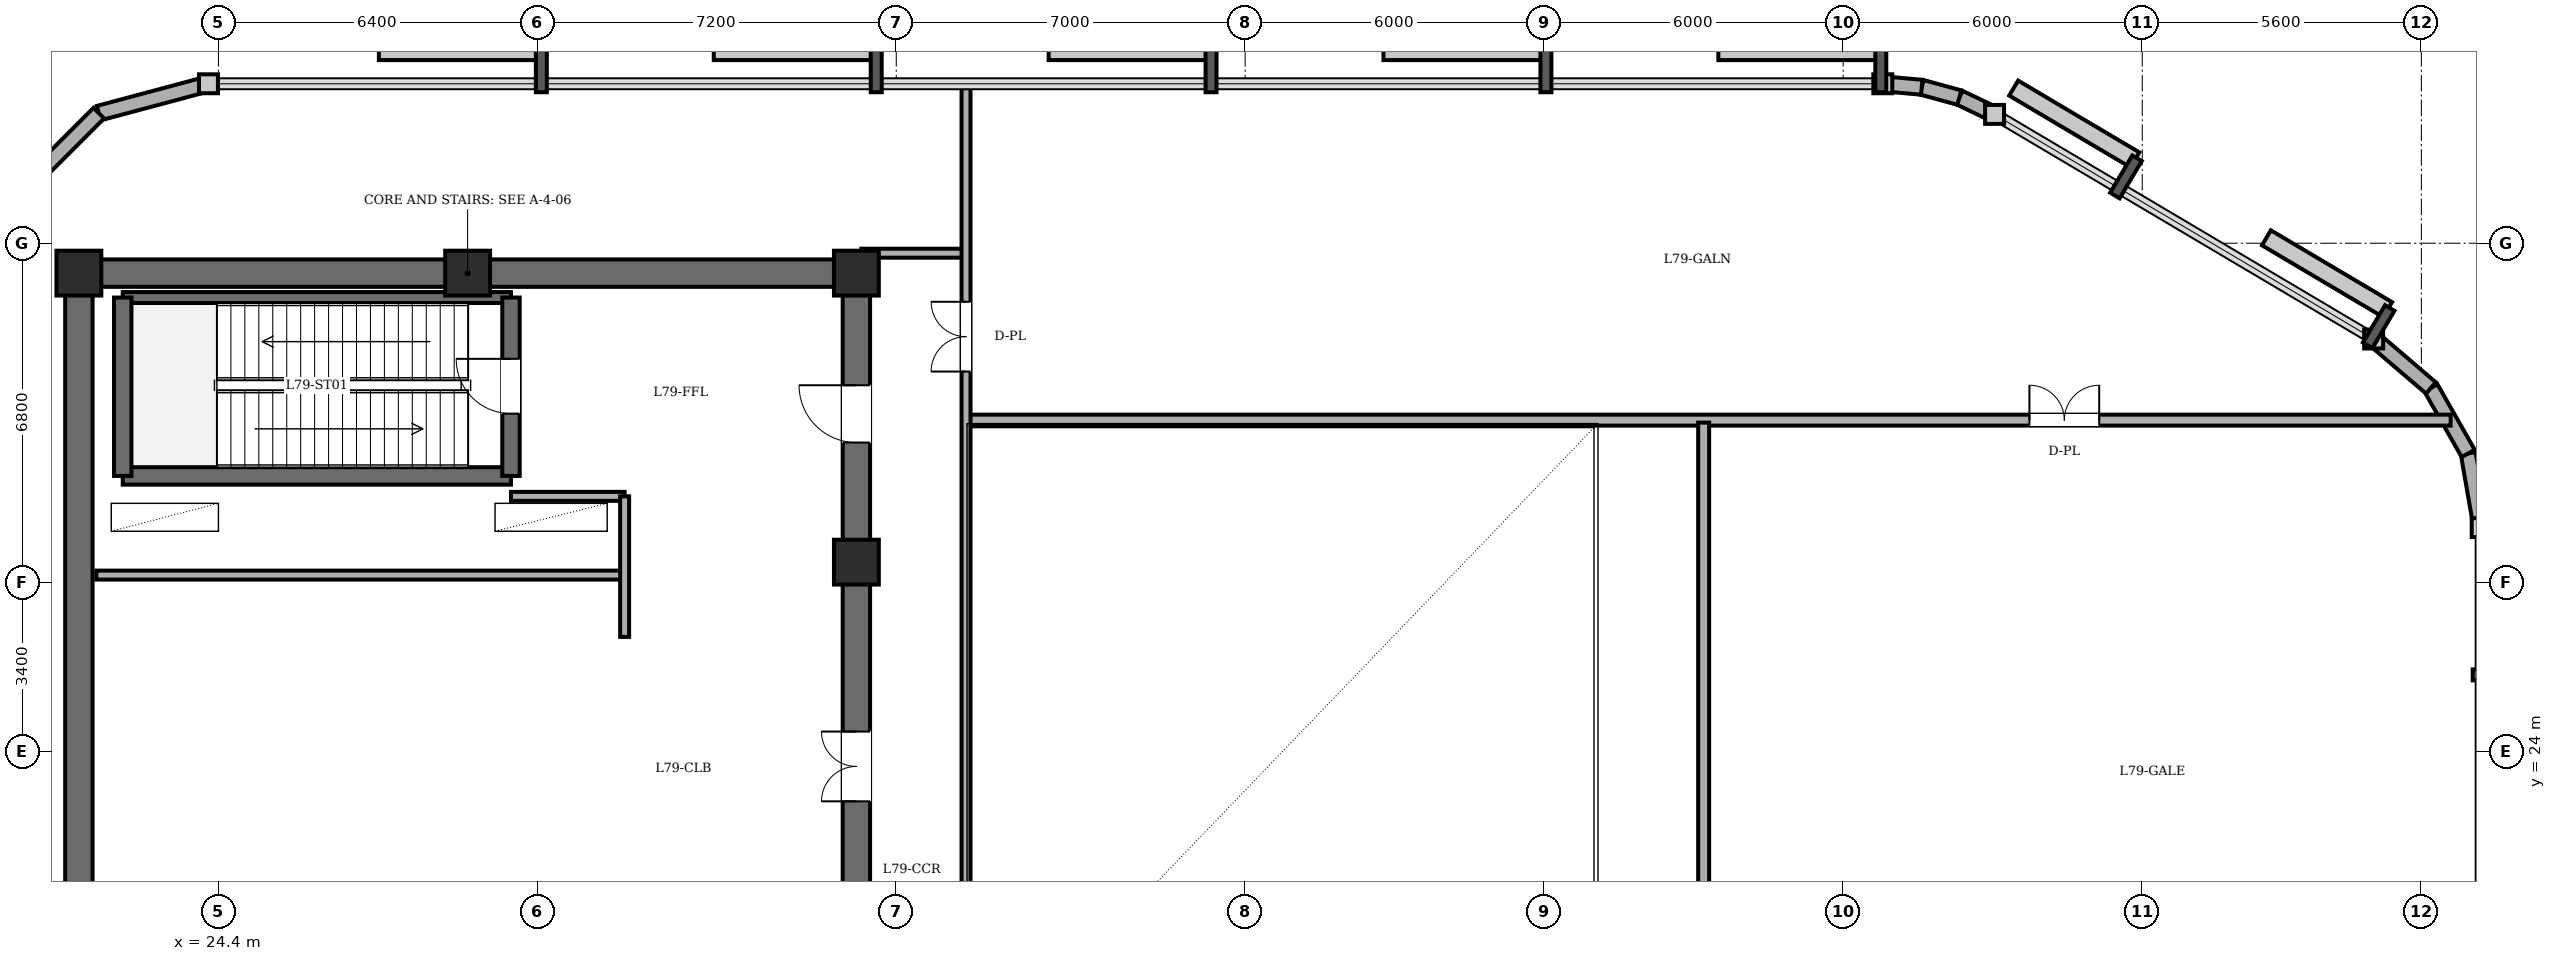
"""IFC4 building model, lengths in metres.
Left out: names, types, materials, properties, quantities, classifications, styles, units other than length and angle.
Written with IfcOpenShell. Run it as: python <this file> out.ifc"""

import sys

from ifc_helpers import new_model, si_unit, direction, frame, frame_2d, origin, origin_2d, place, context, subcontext, project, spatial, rectangle, extrude, element, fill, save


model = new_model("IFC4")
c1 = context("Model", 3, precision=1e-05, world=origin(), true_north=direction((0.0, 1.0)))
c2 = subcontext(c1, "Body", "Model", "MODEL_VIEW")
j1 = project(units=[si_unit("LENGTHUNIT", "METRE"), si_unit("PLANEANGLEUNIT", "RADIAN")], contexts=[c1])
p1 = place(None, origin())
s1 = spatial("IfcSite", under=j1, at=p1, CompositionType="ELEMENT")
p2 = place(p1, origin())
s2 = spatial("IfcBuilding", under=s1, at=p2, CompositionType="ELEMENT")
p3 = place(p2, frame((0.0, 0.0, 308.0)))
s3 = spatial("IfcBuildingStorey", under=s2, at=p3, CompositionType="ELEMENT", Elevation=308.0)
for number, where, z_axis, x_axis in (
    (1, (37.2, 27.8, 0.0), (0.0, 0.0, 1.0), (1.0, 0.0, 0.0)),
    (2, (37.2, 33.6, 0.0), (0.0, 0.0, 1.0), (1.0, 0.0, 0.0)),
    (3, (29.4, 33.6, 0.0), (0.0, 0.0, 1.0), (1.0, 0.0, 0.0)),
    (4, (21.6, 33.6, 0.0), (0.0, 0.0, 1.0), (1.0, 0.0, 0.0)),
):
    element("IfcColumn", number, at=place(p3, frame(where, z_axis=z_axis, x_axis=x_axis)), inside=s3, PredefinedType="COLUMN", context=c2, shape_type="SweptSolid", body=[
        extrude(rectangle(XDim=0.9, YDim=0.9, at=origin_2d()), origin(), (0.0, 0.0, 1.0), 7.2),
    ])
p4 = place(p3, frame((69.8, 28.493, 0.0), z_axis=(0.0, 0.0, 1.0), x_axis=(-0.172015950979, 0.985094164336, 0.0)))
e5 = element("IfcWall", 5, at=p4, inside=s3, PredefinedType="SOLIDWALL", context=c2, shape_type="SweptSolid", body=[
    extrude(rectangle(XDim=1.511, YDim=0.3, at=frame_2d((0.756, 0.0))), origin(), (0.0, 0.0, 1.0), 7.2),
])
p5 = place(p3, frame((69.54, 29.982, 0.0), z_axis=(0.0, 0.0, 1.0), x_axis=(-0.494747166685, 0.869036961847, 0.0)))
e6 = element("IfcWall", 6, at=p5, inside=s3, PredefinedType="SOLIDWALL", context=c2, shape_type="SweptSolid", body=[
    extrude(rectangle(XDim=1.512, YDim=0.3, at=frame_2d((0.756, 0.0))), origin(), (0.0, 0.0, 1.0), 7.2),
])
p6 = place(p3, frame((68.792, 31.296, 0.0), z_axis=(0.0, 0.0, 1.0), x_axis=(-0.76011105051, 0.649793190863, 0.0)))
e7 = element("IfcWall", 7, at=p6, inside=s3, PredefinedType="SOLIDWALL", context=c2, shape_type="SweptSolid", body=[
    extrude(rectangle(XDim=1.511, YDim=0.3, at=frame_2d((0.756, 0.0))), origin(), (0.0, 0.0, 1.0), 7.2),
])
p7 = place(p3, frame((60.037, 36.785, 0.0), z_axis=(0.0, 0.0, 1.0), x_axis=(-0.902139493314, 0.43144447453, 0.0)))
e8 = element("IfcWall", 8, at=p7, inside=s3, PredefinedType="SOLIDWALL", context=c2, shape_type="SweptSolid", body=[
    extrude(rectangle(XDim=0.784, YDim=0.3, at=frame_2d((0.392, 0.0))), origin(), (0.0, 0.0, 1.0), 7.2),
])
p8 = place(p3, frame((59.33, 37.123, 0.0), z_axis=(0.0, 0.0, 1.0), x_axis=(-0.964410376476, 0.264409957728, 0.0)))
e9 = element("IfcWall", 9, at=p8, inside=s3, PredefinedType="SOLIDWALL", context=c2, shape_type="SweptSolid", body=[
    extrude(rectangle(XDim=0.783, YDim=0.3, at=frame_2d((0.392, 0.0))), origin(), (0.0, 0.0, 1.0), 7.2),
])
p9 = place(p3, frame((58.575, 37.33, 0.0), z_axis=(0.0, 0.0, 1.0), x_axis=(-0.996027356167, 0.089047772386, 0.0)))
e10 = element("IfcWall", 10, at=p9, inside=s3, PredefinedType="SOLIDWALL", context=c2, shape_type="SweptSolid", body=[
    extrude(rectangle(XDim=0.784, YDim=0.3, at=frame_2d((0.392, 0.0))), origin(), (0.0, 0.0, 1.0), 7.2),
])
p10 = place(p3, frame((24.2, 37.4, 0.0), z_axis=(0.0, 0.0, 1.0), x_axis=(-0.965992531735, -0.258569968543, 0.0)))
e11 = element("IfcWall", 11, at=p10, inside=s3, PredefinedType="SOLIDWALL", context=c2, shape_type="SweptSolid", body=[
    extrude(rectangle(XDim=2.277, YDim=0.3, at=frame_2d((1.139, 0.0))), origin(), (0.0, 0.0, 1.0), 7.2),
])
p11 = place(p3, frame((22.0, 36.811, 0.0), z_axis=(0.0, 0.0, 1.0), x_axis=(-0.707106781187, -0.707106781187, 0.0)))
e12 = element("IfcWall", 12, at=p11, inside=s3, PredefinedType="SOLIDWALL", context=c2, shape_type="SweptSolid", body=[
    extrude(rectangle(XDim=2.278, YDim=0.3, at=frame_2d((1.139, 0.0))), origin(), (0.0, 0.0, 1.0), 7.2),
])
p12 = place(p3, frame((21.6, 14.4, 0.0), z_axis=(0.0, 0.0, 1.0), x_axis=(0.0, 1.0, 0.0)))
e13 = element("IfcWall", 13, at=p12, inside=s3, PredefinedType="SHEAR", context=c2, shape_type="SweptSolid", body=[
    extrude(rectangle(XDim=19.2, YDim=0.55, at=frame_2d((9.6, 0.0))), origin(), (0.0, 0.0, 1.0), 6.95),
])
p13 = place(p3, frame((21.6, 33.6, 0.0), z_axis=(0.0, 0.0, 1.0), x_axis=(1.0, 0.0, 0.0)))
e14 = element("IfcWall", 14, at=p13, inside=s3, PredefinedType="SHEAR", context=c2, shape_type="SweptSolid", body=[
    extrude(rectangle(XDim=15.6, YDim=0.55, at=frame_2d((7.8, 0.0))), origin(), (0.0, 0.0, 1.0), 6.95),
])
p14 = place(p3, frame((37.2, 14.4, 0.0), z_axis=(0.0, 0.0, 1.0), x_axis=(0.0, 1.0, 0.0)))
e15 = element("IfcWall", 15, at=p14, inside=s3, PredefinedType="SHEAR", context=c2, shape_type="SweptSolid", body=[
    extrude(rectangle(XDim=19.2, YDim=0.55, at=frame_2d((9.6, 0.0))), origin(), (0.0, 0.0, 1.0), 6.95),
])
p15 = place(p14, frame((15.8, 0.0, 0.0)))
e16 = element("IfcOpeningElement", 16, at=p15, cuts=e15, PredefinedType="OPENING", context=c2, shape_type="SweptSolid", body=[
    extrude(rectangle(XDim=1.15, YDim=2.15, at=frame_2d((0.575, 1.075))), frame((0.0, 0.285, 0.0), z_axis=(0.0, -1.0, 0.0), x_axis=(1.0, 0.0, 0.0)), (0.0, 0.0, 1.0), 0.57),
])
p16 = place(p14, frame((3.6, 0.0, 0.0)))
e17 = element("IfcOpeningElement", 17, at=p16, cuts=e15, PredefinedType="OPENING", context=c2, shape_type="SweptSolid", body=[
    extrude(rectangle(XDim=1.1, YDim=2.15, at=frame_2d((0.55, 1.075))), frame((0.0, 0.285, 0.0), z_axis=(0.0, -1.0, 0.0), x_axis=(1.0, 0.0, 0.0)), (0.0, 0.0, 1.0), 0.57),
])
p17 = place(p14, frame((8.6, 0.0, 0.0)))
e18 = element("IfcOpeningElement", 18, at=p17, cuts=e15, PredefinedType="OPENING", context=c2, shape_type="SweptSolid", body=[
    extrude(rectangle(XDim=1.4, YDim=2.25, at=frame_2d((0.7, 1.125))), frame((0.0, 0.285, 0.0), z_axis=(0.0, -1.0, 0.0), x_axis=(1.0, 0.0, 0.0)), (0.0, 0.0, 1.0), 0.57),
])
p18 = place(p3, frame((22.48, 29.53, 0.0), z_axis=(0.0, 0.0, 1.0), x_axis=(1.0, 0.0, 0.0)))
e19 = element("IfcWall", 19, at=p18, inside=s3, PredefinedType="SOLIDWALL", context=c2, shape_type="SweptSolid", body=[
    extrude(rectangle(XDim=7.79, YDim=0.35, at=frame_2d((3.895, 0.0))), origin(), (0.0, 0.0, 1.0), 6.95),
])
p19 = place(p3, frame((22.48, 33.11, 0.0), z_axis=(0.0, 0.0, 1.0), x_axis=(1.0, 0.0, 0.0)))
e20 = element("IfcWall", 20, at=p19, inside=s3, PredefinedType="PARTITIONING", context=c2, shape_type="SweptSolid", body=[
    extrude(rectangle(XDim=7.79, YDim=0.22, at=frame_2d((3.895, 0.0))), origin(), (0.0, 0.0, 1.0), 6.95),
])
p20 = place(p3, frame((22.48, 29.53, 0.0), z_axis=(0.0, 0.0, 1.0), x_axis=(0.0, 1.0, 0.0)))
e21 = element("IfcWall", 21, at=p20, inside=s3, PredefinedType="SOLIDWALL", context=c2, shape_type="SweptSolid", body=[
    extrude(rectangle(XDim=3.58, YDim=0.35, at=frame_2d((1.79, 0.0))), origin(), (0.0, 0.0, 1.0), 6.95),
])
p21 = place(p3, frame((30.27, 29.53, 0.0), z_axis=(0.0, 0.0, 1.0), x_axis=(0.0, 1.0, 0.0)))
e22 = element("IfcWall", 22, at=p21, inside=s3, PredefinedType="SOLIDWALL", context=c2, shape_type="SweptSolid", body=[
    extrude(rectangle(XDim=3.58, YDim=0.35, at=frame_2d((1.79, 0.0))), origin(), (0.0, 0.0, 1.0), 6.95),
])
p22 = place(p21, frame((1.25, 0.0, 0.0)))
e23 = element("IfcOpeningElement", 23, at=p22, cuts=e22, PredefinedType="OPENING", context=c2, shape_type="SweptSolid", body=[
    extrude(rectangle(XDim=1.1, YDim=2.15, at=frame_2d((0.55, 1.075))), frame((0.0, 0.185, 0.0), z_axis=(0.0, -1.0, 0.0), x_axis=(1.0, 0.0, 0.0)), (0.0, 0.0, 1.0), 0.37),
])
p23 = place(p3, frame((30.27, 29.12, 0.0), z_axis=(0.0, 0.0, 1.0), x_axis=(1.0, 0.0, 0.0)))
e24 = element("IfcWall", 24, at=p23, inside=s3, PredefinedType="PARTITIONING", context=c2, shape_type="SweptSolid", body=[
    extrude(rectangle(XDim=2.28, YDim=0.18, at=frame_2d((1.14, 0.0))), origin(), (0.0, 0.0, 1.0), 6.95),
])
p24 = place(p3, frame((21.95, 27.54, 0.0), z_axis=(0.0, 0.0, 1.0), x_axis=(1.0, 0.0, 0.0)))
e25 = element("IfcWall", 25, at=p24, inside=s3, PredefinedType="PARTITIONING", context=c2, shape_type="SweptSolid", body=[
    extrude(rectangle(XDim=10.6, YDim=0.18, at=frame_2d((5.3, 0.0))), origin(), (0.0, 0.0, 1.0), 6.95),
])
p25 = place(p3, frame((32.55, 26.3, 0.0), z_axis=(0.0, 0.0, 1.0), x_axis=(0.0, 1.0, 0.0)))
e26 = element("IfcWall", 26, at=p25, inside=s3, PredefinedType="PARTITIONING", context=c2, shape_type="SweptSolid", body=[
    extrude(rectangle(XDim=2.82, YDim=0.18, at=frame_2d((1.41, 0.0))), origin(), (0.0, 0.0, 1.0), 6.95),
])
p26 = place(p3, frame((39.4, 30.65, 0.0), z_axis=(0.0, 0.0, 1.0), x_axis=(1.0, 0.0, 0.0)))
e27 = element("IfcWall", 27, at=p26, inside=s3, PredefinedType="PARTITIONING", context=c2, shape_type="SweptSolid", body=[
    extrude(rectangle(XDim=29.788, YDim=0.22, at=frame_2d((14.894, 0.0))), origin(), (0.0, 0.0, 1.0), 6.432),
])
p27 = place(p26, frame((21.336, 0.0, 0.0)))
e28 = element("IfcOpeningElement", 28, at=p27, cuts=e27, PredefinedType="OPENING", context=c2, shape_type="SweptSolid", body=[
    extrude(rectangle(XDim=1.4, YDim=2.25, at=frame_2d((0.7, 1.125))), frame((0.0, 0.12, 0.0), z_axis=(0.0, -1.0, 0.0), x_axis=(1.0, 0.0, 0.0)), (0.0, 0.0, 1.0), 0.24),
])
p28 = place(p3, frame((37.3, 34.0, 0.0), z_axis=(0.0, 0.0, 1.0), x_axis=(1.0, 0.0, 0.0)))
e29 = element("IfcWall", 29, at=p28, inside=s3, PredefinedType="PARTITIONING", context=c2, shape_type="SweptSolid", body=[
    extrude(rectangle(XDim=2.1, YDim=0.18, at=frame_2d((1.05, 0.0))), origin(), (0.0, 0.0, 1.0), 6.95),
])
p29 = place(p3, frame((39.4, 10.6, 0.0), z_axis=(0.0, 0.0, 1.0), x_axis=(0.0, 1.0, 0.0)))
e30 = element("IfcWall", 30, at=p29, inside=s3, PredefinedType="PARTITIONING", context=c2, shape_type="SweptSolid", body=[
    extrude(rectangle(XDim=26.8, YDim=0.18, at=frame_2d((13.4, 0.0))), origin(), (0.0, 0.0, 1.0), 6.95),
])
p30 = place(p29, frame((21.025, 0.0, 0.0)))
e31 = element("IfcOpeningElement", 31, at=p30, cuts=e30, PredefinedType="OPENING", context=c2, shape_type="SweptSolid", body=[
    extrude(rectangle(XDim=1.4, YDim=2.25, at=frame_2d((0.7, 1.125))), frame((0.0, 0.1, 0.0), z_axis=(0.0, -1.0, 0.0), x_axis=(1.0, 0.0, 0.0)), (0.0, 0.0, 1.0), 0.2),
])
p31 = place(p29, frame((4.375, 0.0, 0.0)))
e32 = element("IfcOpeningElement", 32, at=p31, cuts=e30, PredefinedType="OPENING", context=c2, shape_type="SweptSolid", body=[
    extrude(rectangle(XDim=1.4, YDim=2.25, at=frame_2d((0.7, 1.125))), frame((0.0, 0.1, 0.0), z_axis=(0.0, -1.0, 0.0), x_axis=(1.0, 0.0, 0.0)), (0.0, 0.0, 1.0), 0.2),
])
p32 = place(p3, frame((54.2, 17.4, 0.0), z_axis=(0.0, 0.0, 1.0), x_axis=(0.0, 1.0, 0.0)))
e33 = element("IfcWall", 33, at=p32, inside=s3, PredefinedType="PARTITIONING", context=c2, shape_type="SweptSolid", body=[
    extrude(rectangle(XDim=13.2, YDim=0.22, at=frame_2d((6.6, 0.0))), origin(), (0.0, 0.0, 1.0), 6.95),
])
p33 = place(p22, origin())
e34 = element("IfcDoor", 34, at=p33, inside=s3, OperationType="SINGLE_SWING_RIGHT", PredefinedType="DOOR", context=c2, shape_type="SweptSolid", body=[
    extrude(rectangle(XDim=1.1, YDim=2.15, at=frame_2d((0.55, 1.075))), frame((0.0, 0.025, 0.0), z_axis=(0.0, -1.0, 0.0), x_axis=(1.0, 0.0, 0.0)), (0.0, 0.0, 1.0), 0.05),
])
fill(e23, e34)
p34 = place(p15, origin())
e35 = element("IfcDoor", 35, at=p34, inside=s3, OperationType="SINGLE_SWING_RIGHT", PredefinedType="DOOR", context=c2, shape_type="SweptSolid", body=[
    extrude(rectangle(XDim=1.15, YDim=2.15, at=frame_2d((0.575, 1.075))), frame((0.0, 0.025, 0.0), z_axis=(0.0, -1.0, 0.0), x_axis=(1.0, 0.0, 0.0)), (0.0, 0.0, 1.0), 0.05),
])
fill(e16, e35)
p35 = place(p17, origin())
e36 = element("IfcDoor", 36, at=p35, inside=s3, OperationType="DOUBLE_DOOR_SINGLE_SWING", PredefinedType="DOOR", context=c2, shape_type="SweptSolid", body=[
    extrude(rectangle(XDim=1.4, YDim=2.25, at=frame_2d((0.7, 1.125))), frame((0.0, 0.025, 0.0), z_axis=(0.0, -1.0, 0.0), x_axis=(1.0, 0.0, 0.0)), (0.0, 0.0, 1.0), 0.05),
])
fill(e18, e36)
p36 = place(p30, origin())
e37 = element("IfcDoor", 37, at=p36, inside=s3, OperationType="DOUBLE_DOOR_SINGLE_SWING", PredefinedType="DOOR", context=c2, shape_type="SweptSolid", body=[
    extrude(rectangle(XDim=1.4, YDim=2.25, at=frame_2d((0.7, 1.125))), frame((0.0, 0.025, 0.0), z_axis=(0.0, -1.0, 0.0), x_axis=(1.0, 0.0, 0.0)), (0.0, 0.0, 1.0), 0.05),
])
fill(e31, e37)
p37 = place(p27, origin())
e38 = element("IfcDoor", 38, at=p37, inside=s3, OperationType="DOUBLE_DOOR_SINGLE_SWING", PredefinedType="DOOR", context=c2, shape_type="SweptSolid", body=[
    extrude(rectangle(XDim=1.4, YDim=2.25, at=frame_2d((0.7, 1.125))), frame((0.0, 0.025, 0.0), z_axis=(0.0, -1.0, 0.0), x_axis=(1.0, 0.0, 0.0)), (0.0, 0.0, 1.0), 0.05),
])
fill(e28, e38)
save(model, sys.argv[1])
